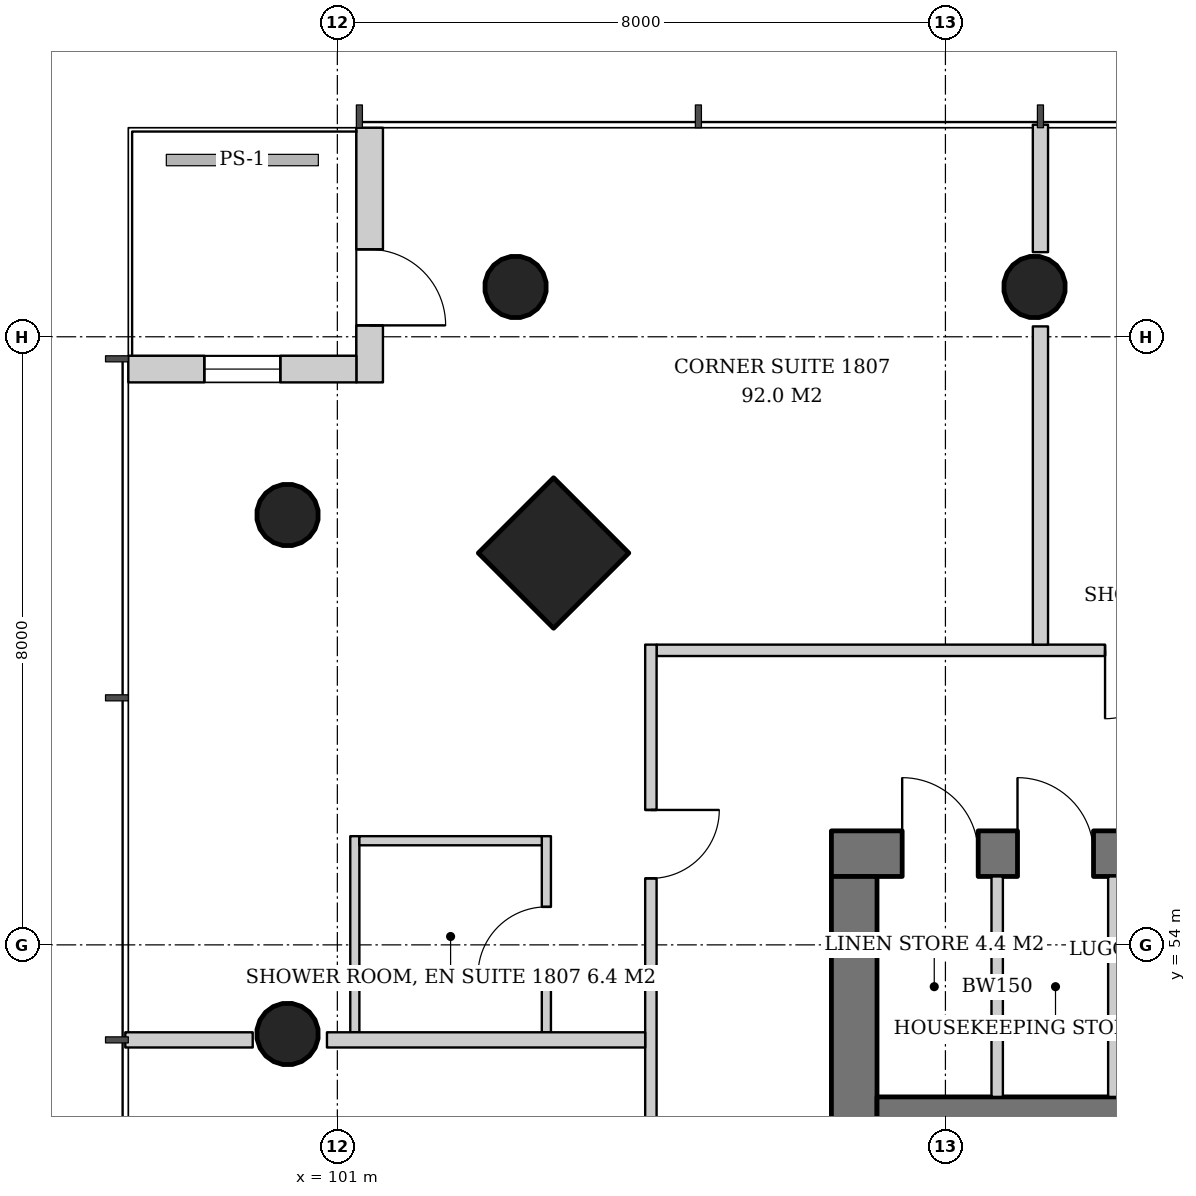
"""IFC4 building model, lengths in metres.
Left out: names, types, materials, properties, quantities, classifications, styles, units other than length and angle.
Written with IfcOpenShell. Run it as: python <this file> out.ifc"""

import sys

from ifc_helpers import new_model, si_unit, direction, frame, frame_2d, origin, origin_2d, place, context, subcontext, project, spatial, rectangle, hollow_circle, extrude, element, fill, save


model = new_model("IFC4")
c1 = context("Model", 3, precision=1e-05, world=origin(), true_north=direction((0.0, 1.0)))
c2 = subcontext(c1, "Body", "Model", "MODEL_VIEW")
j1 = project(units=[si_unit("LENGTHUNIT", "METRE"), si_unit("PLANEANGLEUNIT", "RADIAN")], contexts=[c1])
p1 = place(None, origin())
s1 = spatial("IfcSite", under=j1, at=p1, CompositionType="ELEMENT")
p2 = place(p1, origin())
s2 = spatial("IfcBuilding", under=s1, at=p2, CompositionType="ELEMENT")
p3 = place(p2, frame((0.0, 0.0, 74.2)))
s3 = spatial("IfcBuildingStorey", under=s2, at=p3, CompositionType="ELEMENT", Elevation=74.2)
p4 = place(p3, frame((103.793, 59.207, 0.0), z_axis=(0.042965756413, -0.042965756413, 0.998152236661), x_axis=(0.707106781187, 0.707106781187, 0.0)))
e1 = element("IfcColumn", 1, at=p4, inside=s3, PredefinedType="COLUMN", context=c2, shape_type="SweptSolid", body=[
    extrude(rectangle(XDim=1.4, YDim=1.4, at=origin_2d()), origin(), (0.0, 0.0, 1.0), 3.807),
])
p5 = place(p3, frame((103.293, 62.707, 0.0), z_axis=(0.042965756413, -0.042965756413, 0.998152236661), x_axis=(0.707106781187, 0.707106781187, 0.0)))
e2 = element("IfcColumn", 2, at=p5, inside=s3, PredefinedType="COLUMN", context=c2, shape_type="SweptSolid", body=[
    extrude(hollow_circle(Radius=0.406, WallThickness=0.03, at=origin_2d()), origin(), (0.0, 0.0, 1.0), 3.807),
])
p6 = place(p3, frame((110.146, 62.707, 0.0), z_axis=(0.021561908287, -0.042995471882, 0.998842566929), x_axis=(0.89389288677, 0.448280611873, 0.0)))
e3 = element("IfcColumn", 3, at=p6, inside=s3, PredefinedType="COLUMN", context=c2, shape_type="SweptSolid", body=[
    extrude(hollow_circle(Radius=0.406, WallThickness=0.03, at=origin_2d()), origin(), (0.0, 0.0, 1.0), 3.804),
])
p7 = place(p3, frame((100.293, 59.707, 0.0), z_axis=(0.042965756413, -0.042965756413, 0.998152236661), x_axis=(0.707106781187, 0.707106781187, 0.0)))
e4 = element("IfcColumn", 4, at=p7, inside=s3, PredefinedType="COLUMN", context=c2, shape_type="SweptSolid", body=[
    extrude(hollow_circle(Radius=0.406, WallThickness=0.03, at=origin_2d()), origin(), (0.0, 0.0, 1.0), 3.807),
])
p8 = place(p3, frame((100.293, 52.854, 0.0), z_axis=(0.042995471882, -0.021561908287, 0.998842566929), x_axis=(0.448280611873, 0.89389288677, 0.0)))
e5 = element("IfcColumn", 5, at=p8, inside=s3, PredefinedType="COLUMN", context=c2, shape_type="SweptSolid", body=[
    extrude(hollow_circle(Radius=0.406, WallThickness=0.03, at=origin_2d()), origin(), (0.0, 0.0, 1.0), 3.804),
])
p9 = place(p3, frame((107.5, 55.2, 0.0), z_axis=(0.0, 0.0, 1.0), x_axis=(1.0, 0.0, 0.0)))
e6 = element("IfcWall", 6, at=p9, inside=s3, PredefinedType="SHEAR", context=c2, shape_type="SweptSolid", body=[
    extrude(rectangle(XDim=19.0, YDim=0.6, at=frame_2d((9.5, 0.0))), origin(), (0.0, 0.0, 1.0), 3.8),
])
p10 = place(p9, frame((14.14, 0.0, 0.0)))
e7 = element("IfcOpeningElement", 7, at=p10, cuts=e6, PredefinedType="OPENING", context=c2, shape_type="SweptSolid", body=[
    extrude(rectangle(XDim=1.0, YDim=2.1, at=frame_2d((0.5, 1.05))), frame((0.0, 0.31, 0.0), z_axis=(0.0, -1.0, 0.0), x_axis=(1.0, 0.0, 0.0)), (0.0, 0.0, 1.0), 0.62),
])
p11 = place(p9, frame((0.931, 0.0, 0.0)))
e8 = element("IfcOpeningElement", 8, at=p11, cuts=e6, PredefinedType="OPENING", context=c2, shape_type="SweptSolid", body=[
    extrude(rectangle(XDim=1.0, YDim=2.1, at=frame_2d((0.5, 1.05))), frame((0.0, 0.31, 0.0), z_axis=(0.0, -1.0, 0.0), x_axis=(1.0, 0.0, 0.0)), (0.0, 0.0, 1.0), 0.62),
])
p12 = place(p9, frame((2.448, 0.0, 0.0)))
e9 = element("IfcOpeningElement", 9, at=p12, cuts=e6, PredefinedType="OPENING", context=c2, shape_type="SweptSolid", body=[
    extrude(rectangle(XDim=1.0, YDim=2.1, at=frame_2d((0.5, 1.05))), frame((0.0, 0.31, 0.0), z_axis=(0.0, -1.0, 0.0), x_axis=(1.0, 0.0, 0.0)), (0.0, 0.0, 1.0), 0.62),
])
p13 = place(p9, frame((3.983, 0.0, 0.0)))
e10 = element("IfcOpeningElement", 10, at=p13, cuts=e6, PredefinedType="OPENING", context=c2, shape_type="SweptSolid", body=[
    extrude(rectangle(XDim=1.0, YDim=2.1, at=frame_2d((0.5, 1.05))), frame((0.0, 0.31, 0.0), z_axis=(0.0, -1.0, 0.0), x_axis=(1.0, 0.0, 0.0)), (0.0, 0.0, 1.0), 0.62),
])
p14 = place(p3, frame((107.8, 37.1, 0.0), z_axis=(0.0, 0.0, 1.0), x_axis=(0.0, 1.0, 0.0)))
e11 = element("IfcWall", 11, at=p14, inside=s3, PredefinedType="SHEAR", context=c2, shape_type="SweptSolid", body=[
    extrude(rectangle(XDim=17.8, YDim=0.6, at=frame_2d((8.9, 0.0))), origin(), (0.0, 0.0, 1.0), 3.8),
])
p15 = place(p14, frame((8.0, 0.0, 0.0)))
e12 = element("IfcOpeningElement", 12, at=p15, cuts=e11, PredefinedType="OPENING", context=c2, shape_type="SweptSolid", body=[
    extrude(rectangle(XDim=1.8, YDim=2.4, at=frame_2d((0.9, 1.2))), frame((0.0, 0.31, 0.0), z_axis=(0.0, -1.0, 0.0), x_axis=(1.0, 0.0, 0.0)), (0.0, 0.0, 1.0), 0.62),
])
p16 = place(p3, frame((108.1, 51.8, 0.0), z_axis=(0.0, 0.0, 1.0), x_axis=(1.0, 0.0, 0.0)))
e13 = element("IfcWall", 13, at=p16, inside=s3, PredefinedType="SHEAR", context=c2, shape_type="SweptSolid", body=[
    extrude(rectangle(XDim=17.8, YDim=0.4, at=frame_2d((8.9, 0.0))), origin(), (0.0, 0.0, 1.0), 3.8),
])
p17 = place(p3, frame((101.425, 64.75, 0.0), z_axis=(0.0, 0.0, 1.0), x_axis=(0.0, -1.0, 0.0)))
e14 = element("IfcWall", 14, at=p17, inside=s3, PredefinedType="SOLIDWALL", context=c2, shape_type="SweptSolid", body=[
    extrude(rectangle(XDim=3.35, YDim=0.35, at=frame_2d((1.675, 0.0))), origin(), (0.0, 0.0, 1.0), 3.6),
])
p18 = place(p17, frame((1.6, 0.0, 0.0)))
e15 = element("IfcOpeningElement", 15, at=p18, cuts=e14, PredefinedType="OPENING", context=c2, shape_type="SweptSolid", body=[
    extrude(rectangle(XDim=1.0, YDim=2.4, at=frame_2d((0.5, 1.2))), frame((0.0, 0.185, 0.0), z_axis=(0.0, -1.0, 0.0), x_axis=(1.0, 0.0, 0.0)), (0.0, 0.0, 1.0), 0.37),
])
p19 = place(p3, frame((101.25, 61.575, 0.0), z_axis=(0.0, 0.0, 1.0), x_axis=(-1.0, 0.0, 0.0)))
e16 = element("IfcWall", 16, at=p19, inside=s3, PredefinedType="SOLIDWALL", context=c2, shape_type="SweptSolid", body=[
    extrude(rectangle(XDim=3.0, YDim=0.35, at=frame_2d((1.5, 0.0))), origin(), (0.0, 0.0, 1.0), 3.6),
])
p20 = place(p19, frame((1.0, 0.0, 0.9)))
e17 = element("IfcOpeningElement", 17, at=p20, cuts=e16, PredefinedType="OPENING", context=c2, shape_type="SweptSolid", body=[
    extrude(rectangle(XDim=1.0, YDim=2.4, at=frame_2d((0.5, 1.2))), frame((0.0, 0.185, 0.0), z_axis=(0.0, -1.0, 0.0), x_axis=(1.0, 0.0, 0.0)), (0.0, 0.0, 1.0), 0.37),
])
for number, where, z_axis, x_axis in (
    (18, (109.681, 52.0, 0.0), (0.0, 0.0, 1.0), (0.0, 1.0, 0.0)),
    (19, (111.216, 52.0, 0.0), (0.0, 0.0, 1.0), (0.0, 1.0, 0.0)),
):
    element("IfcWall", number, at=place(p3, frame(where, z_axis=z_axis, x_axis=x_axis)), inside=s3, PredefinedType="SOLIDWALL", context=c2, shape_type="SweptSolid", body=[
        extrude(rectangle(XDim=2.9, YDim=0.15, at=frame_2d((1.45, 0.0))), origin(), (0.0, 0.0, 1.0), 3.6),
    ])
p21 = place(p3, frame((128.95, 57.875, 0.0), z_axis=(0.0, 0.0, 1.0), x_axis=(-1.0, 0.0, 0.0)))
e20 = element("IfcWall", 20, at=p21, inside=s3, PredefinedType="PARTITIONING", context=c2, shape_type="SweptSolid", body=[
    extrude(rectangle(XDim=23.75, YDim=0.15, at=frame_2d((11.875, 0.0))), origin(), (0.0, 0.0, 1.0), 2.8),
])
p22 = place(p21, frame((2.175, 0.0, 0.0)))
e21 = element("IfcOpeningElement", 21, at=p22, cuts=e20, PredefinedType="OPENING", context=c2, shape_type="SweptSolid", body=[
    extrude(rectangle(XDim=0.9, YDim=2.1, at=frame_2d((0.45, 1.05))), frame((0.0, 0.085, 0.0), z_axis=(0.0, -1.0, 0.0), x_axis=(1.0, 0.0, 0.0)), (0.0, 0.0, 1.0), 0.17),
])
p23 = place(p21, frame((7.95, 0.0, 0.0)))
e22 = element("IfcOpeningElement", 22, at=p23, cuts=e20, PredefinedType="OPENING", context=c2, shape_type="SweptSolid", body=[
    extrude(rectangle(XDim=0.9, YDim=2.1, at=frame_2d((0.45, 1.05))), frame((0.0, 0.085, 0.0), z_axis=(0.0, -1.0, 0.0), x_axis=(1.0, 0.0, 0.0)), (0.0, 0.0, 1.0), 0.17),
])
p24 = place(p21, frame((16.95, 0.0, 0.0)))
e23 = element("IfcOpeningElement", 23, at=p24, cuts=e20, PredefinedType="OPENING", context=c2, shape_type="SweptSolid", body=[
    extrude(rectangle(XDim=0.9, YDim=2.1, at=frame_2d((0.45, 1.05))), frame((0.0, 0.085, 0.0), z_axis=(0.0, -1.0, 0.0), x_axis=(1.0, 0.0, 0.0)), (0.0, 0.0, 1.0), 0.17),
])
p25 = place(p3, frame((110.25, 57.95, 0.0), z_axis=(0.0, 0.0, 1.0), x_axis=(0.0, 1.0, 0.0)))
e24 = element("IfcWall", 24, at=p25, inside=s3, PredefinedType="PARTITIONING", context=c2, shape_type="SweptSolid", body=[
    extrude(rectangle(XDim=4.187, YDim=0.2, at=frame_2d((2.093, 0.0))), origin(), (0.0, 0.0, 1.0), 3.6),
])
p26 = place(p3, frame((110.25, 63.113, 0.0), z_axis=(0.0, 0.0, 1.0), x_axis=(0.0, 1.0, 0.0)))
e25 = element("IfcWall", 25, at=p26, inside=s3, PredefinedType="PARTITIONING", context=c2, shape_type="SweptSolid", body=[
    extrude(rectangle(XDim=1.677, YDim=0.2, at=frame_2d((0.838, 0.0))), origin(), (0.0, 0.0, 1.0), 3.6),
])
p27 = place(p3, frame((103.75, 52.85, 0.0), z_axis=(0.0, 0.0, 1.0), x_axis=(0.0, 1.0, 0.0)))
e26 = element("IfcWall", 26, at=p27, inside=s3, PredefinedType="PARTITIONING", context=c2, shape_type="SweptSolid", body=[
    extrude(rectangle(XDim=2.58, YDim=0.12, at=frame_2d((1.29, 0.0))), origin(), (0.0, 0.0, 1.0), 2.8),
])
p28 = place(p27, frame((0.75, 0.0, 0.0)))
e27 = element("IfcOpeningElement", 27, at=p28, cuts=e26, PredefinedType="OPENING", context=c2, shape_type="SweptSolid", body=[
    extrude(rectangle(XDim=0.9, YDim=2.1, at=frame_2d((0.45, 1.05))), frame((0.0, 0.07, 0.0), z_axis=(0.0, -1.0, 0.0), x_axis=(1.0, 0.0, 0.0)), (0.0, 0.0, 1.0), 0.14),
])
p29 = place(p3, frame((101.23, 52.85, 0.0), z_axis=(0.0, 0.0, 1.0), x_axis=(0.0, 1.0, 0.0)))
e28 = element("IfcWall", 28, at=p29, inside=s3, PredefinedType="PARTITIONING", context=c2, shape_type="SweptSolid", body=[
    extrude(rectangle(XDim=2.58, YDim=0.12, at=frame_2d((1.29, 0.0))), origin(), (0.0, 0.0, 1.0), 2.8),
])
p30 = place(p3, frame((103.69, 55.37, 0.0), z_axis=(0.0, 0.0, 1.0), x_axis=(-1.0, 0.0, 0.0)))
e29 = element("IfcWall", 29, at=p30, inside=s3, PredefinedType="PARTITIONING", context=c2, shape_type="SweptSolid", body=[
    extrude(rectangle(XDim=2.4, YDim=0.12, at=frame_2d((1.2, 0.0))), origin(), (0.0, 0.0, 1.0), 2.8),
])
p31 = place(p3, frame((105.125, 57.95, 0.0), z_axis=(0.0, 0.0, 1.0), x_axis=(0.0, -1.0, 0.0)))
e30 = element("IfcWall", 30, at=p31, inside=s3, PredefinedType="PARTITIONING", context=c2, shape_type="SweptSolid", body=[
    extrude(rectangle(XDim=23.75, YDim=0.15, at=frame_2d((11.875, 0.0))), origin(), (0.0, 0.0, 1.0), 2.8),
])
p32 = place(p31, frame((2.175, 0.0, 0.0)))
e31 = element("IfcOpeningElement", 31, at=p32, cuts=e30, PredefinedType="OPENING", context=c2, shape_type="SweptSolid", body=[
    extrude(rectangle(XDim=0.9, YDim=2.1, at=frame_2d((0.45, 1.05))), frame((0.0, 0.085, 0.0), z_axis=(0.0, -1.0, 0.0), x_axis=(1.0, 0.0, 0.0)), (0.0, 0.0, 1.0), 0.17),
])
p33 = place(p31, frame((7.9, 0.0, 0.0)))
e32 = element("IfcOpeningElement", 32, at=p33, cuts=e30, PredefinedType="OPENING", context=c2, shape_type="SweptSolid", body=[
    extrude(rectangle(XDim=1.0, YDim=2.1, at=frame_2d((0.5, 1.05))), frame((0.0, 0.085, 0.0), z_axis=(0.0, -1.0, 0.0), x_axis=(1.0, 0.0, 0.0)), (0.0, 0.0, 1.0), 0.17),
])
p34 = place(p31, frame((12.45, 0.0, 0.0)))
e33 = element("IfcOpeningElement", 33, at=p34, cuts=e30, PredefinedType="OPENING", context=c2, shape_type="SweptSolid", body=[
    extrude(rectangle(XDim=0.9, YDim=2.1, at=frame_2d((0.45, 1.05))), frame((0.0, 0.085, 0.0), z_axis=(0.0, -1.0, 0.0), x_axis=(1.0, 0.0, 0.0)), (0.0, 0.0, 1.0), 0.17),
])
p35 = place(p3, frame((105.05, 52.75, 0.0), z_axis=(0.0, 0.0, 1.0), x_axis=(-1.0, 0.0, 0.0)))
e34 = element("IfcWall", 34, at=p35, inside=s3, PredefinedType="PARTITIONING", context=c2, shape_type="SweptSolid", body=[
    extrude(rectangle(XDim=4.187, YDim=0.2, at=frame_2d((2.093, 0.0))), origin(), (0.0, 0.0, 1.0), 3.6),
])
p36 = place(p3, frame((99.887, 52.75, 0.0), z_axis=(0.0, 0.0, 1.0), x_axis=(-1.0, 0.0, 0.0)))
e35 = element("IfcWall", 35, at=p36, inside=s3, PredefinedType="PARTITIONING", context=c2, shape_type="SweptSolid", body=[
    extrude(rectangle(XDim=1.677, YDim=0.2, at=frame_2d((0.838, 0.0))), origin(), (0.0, 0.0, 1.0), 3.6),
])
p37 = place(p18, origin())
e36 = element("IfcDoor", 36, at=p37, inside=s3, OperationType="SINGLE_SWING_RIGHT", PredefinedType="DOOR", context=c2, shape_type="SweptSolid", body=[
    extrude(rectangle(XDim=1.0, YDim=2.4, at=frame_2d((0.5, 1.2))), frame((0.0, 0.025, 0.0), z_axis=(0.0, -1.0, 0.0), x_axis=(1.0, 0.0, 0.0)), (0.0, 0.0, 1.0), 0.05),
])
fill(e15, e36)
p38 = place(p20, origin())
e37 = element("IfcWindow", 37, at=p38, inside=s3, PartitioningType="SINGLE_PANEL", PredefinedType="WINDOW", context=c2, shape_type="SweptSolid", body=[
    extrude(rectangle(XDim=1.0, YDim=2.4, at=frame_2d((0.5, 1.2))), frame((0.0, 0.03, 0.0), z_axis=(0.0, -1.0, 0.0), x_axis=(1.0, 0.0, 0.0)), (0.0, 0.0, 1.0), 0.06),
])
fill(e17, e37)
p39 = place(p11, origin())
e38 = element("IfcDoor", 38, at=p39, inside=s3, OperationType="SINGLE_SWING_LEFT", PredefinedType="DOOR", context=c2, shape_type="SweptSolid", body=[
    extrude(rectangle(XDim=1.0, YDim=2.1, at=frame_2d((0.5, 1.05))), frame((0.0, -0.24, 0.0), z_axis=(0.0, -1.0, 0.0), x_axis=(1.0, 0.0, 0.0)), (0.0, 0.0, 1.0), 0.05),
])
fill(e8, e38)
p40 = place(p12, origin())
e39 = element("IfcDoor", 39, at=p40, inside=s3, OperationType="SINGLE_SWING_LEFT", PredefinedType="DOOR", context=c2, shape_type="SweptSolid", body=[
    extrude(rectangle(XDim=1.0, YDim=2.1, at=frame_2d((0.5, 1.05))), frame((0.0, -0.24, 0.0), z_axis=(0.0, -1.0, 0.0), x_axis=(1.0, 0.0, 0.0)), (0.0, 0.0, 1.0), 0.05),
])
fill(e9, e39)
p41 = place(p24, origin())
e40 = element("IfcDoor", 40, at=p41, inside=s3, OperationType="SINGLE_SWING_RIGHT", PredefinedType="DOOR", context=c2, shape_type="SweptSolid", body=[
    extrude(rectangle(XDim=0.9, YDim=2.1, at=frame_2d((0.45, 1.05))), frame((0.0, 0.025, 0.0), z_axis=(0.0, -1.0, 0.0), x_axis=(1.0, 0.0, 0.0)), (0.0, 0.0, 1.0), 0.05),
])
fill(e23, e40)
p42 = place(p28, origin())
e41 = element("IfcDoor", 41, at=p42, inside=s3, OperationType="SINGLE_SWING_LEFT", PredefinedType="DOOR", context=c2, shape_type="SweptSolid", body=[
    extrude(rectangle(XDim=0.9, YDim=2.1, at=frame_2d((0.45, 1.05))), frame((0.0, 0.025, 0.0), z_axis=(0.0, -1.0, 0.0), x_axis=(1.0, 0.0, 0.0)), (0.0, 0.0, 1.0), 0.05),
])
fill(e27, e41)
p43 = place(p32, origin())
e42 = element("IfcDoor", 42, at=p43, inside=s3, OperationType="SINGLE_SWING_LEFT", PredefinedType="DOOR", context=c2, shape_type="SweptSolid", body=[
    extrude(rectangle(XDim=0.9, YDim=2.1, at=frame_2d((0.45, 1.05))), frame((0.0, 0.025, 0.0), z_axis=(0.0, -1.0, 0.0), x_axis=(1.0, 0.0, 0.0)), (0.0, 0.0, 1.0), 0.05),
])
fill(e31, e42)
save(model, sys.argv[1])
